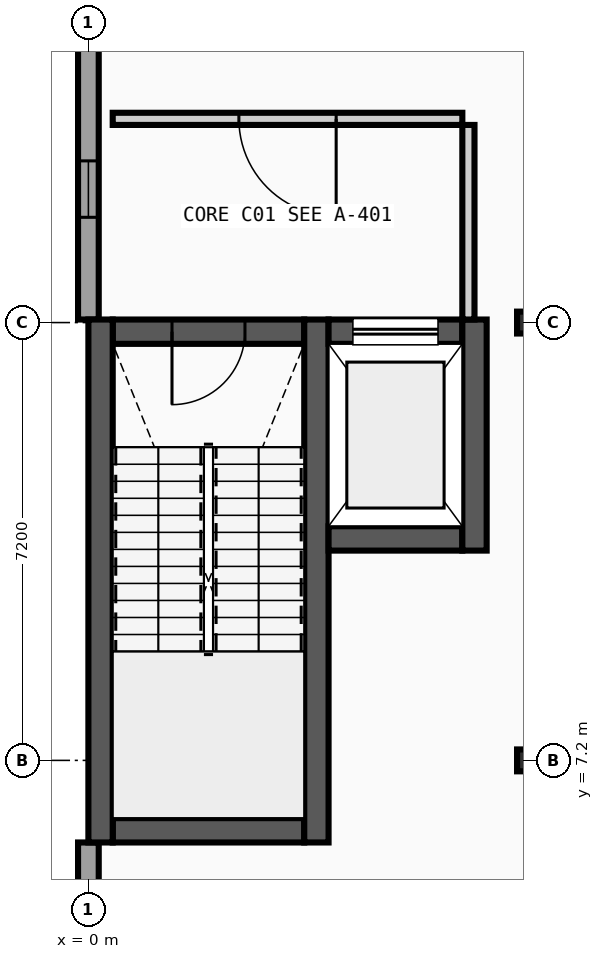
"""IFC4 building model, lengths in metres.
Left out: names, types, materials, properties, quantities, classifications, styles, units other than length and angle.
Written with IfcOpenShell. Run it as: python <this file> out.ifc"""

import sys

from ifc_helpers import new_model, si_unit, direction, frame, frame_2d, origin, origin_2d, place, context, subcontext, project, spatial, rectangle, i_section, extrude, element, fill, save


model = new_model("IFC4")
c1 = context("Model", 3, precision=1e-05, world=origin(), true_north=direction((0.0, 1.0)))
c2 = subcontext(c1, "Body", "Model", "MODEL_VIEW")
j1 = project(units=[si_unit("LENGTHUNIT", "METRE"), si_unit("PLANEANGLEUNIT", "RADIAN")], contexts=[c1])
p1 = place(None, origin())
s1 = spatial("IfcSite", under=j1, at=p1, CompositionType="ELEMENT")
p2 = place(p1, origin())
s2 = spatial("IfcBuilding", under=s1, at=p2, CompositionType="ELEMENT")
p3 = place(p2, frame((0.0, 0.0, 18.4)))
s3 = spatial("IfcBuildingStorey", under=s2, at=p3, CompositionType="ELEMENT", Elevation=18.4)
for number, where, z_axis, x_axis in (
    (1, (7.2, 7.2, 0.0), (0.0, 0.0, 1.0), (1.0, 0.0, 0.0)),
    (2, (7.2, 14.4, 0.0), (0.0, 0.0, 1.0), (1.0, 0.0, 0.0)),
):
    element("IfcColumn", number, at=place(p3, frame(where, z_axis=z_axis, x_axis=x_axis)), inside=s3, PredefinedType="COLUMN", context=c2, shape_type="SweptSolid", body=[
        extrude(i_section(OverallWidth=0.3, OverallDepth=0.36, WebThickness=0.012, FlangeThickness=0.022, FilletRadius=0.027, at=origin_2d()), origin(), (0.0, 0.0, 1.0), 4.4),
    ])
p4 = place(p3, frame((0.0, 5.85, 0.0), z_axis=(0.0, 0.0, 1.0), x_axis=(0.0, -1.0, 0.0)))
e3 = element("IfcWall", 3, at=p4, inside=s3, PredefinedType="STANDARD", context=c2, shape_type="SweptSolid", body=[
    extrude(rectangle(XDim=5.68, YDim=0.34, at=frame_2d((2.84, 0.0))), origin(), (0.0, 0.0, 1.0), 4.215),
])
p5 = place(p4, frame((2.393, 0.0, 0.95)))
e4 = element("IfcOpeningElement", 4, at=p5, cuts=e3, PredefinedType="OPENING", context=c2, shape_type="SweptSolid", body=[
    extrude(rectangle(XDim=0.894, YDim=1.404, at=frame_2d((0.447, 0.702))), frame((0.0, 0.18, 0.0), z_axis=(0.0, -1.0, 0.0), x_axis=(1.0, 0.0, 0.0)), (0.0, 0.0, 1.0), 0.36),
])
p6 = place(p3, frame((0.0, 21.6, 0.0), z_axis=(0.0, 0.0, 1.0), x_axis=(0.0, -1.0, 0.0)))
e5 = element("IfcWall", 5, at=p6, inside=s3, PredefinedType="STANDARD", context=c2, shape_type="SweptSolid", body=[
    extrude(rectangle(XDim=7.15, YDim=0.34, at=frame_2d((3.575, 0.0))), origin(), (0.0, 0.0, 1.0), 4.215),
])
p7 = place(p6, frame((1.681, 0.0, 0.95)))
e6 = element("IfcOpeningElement", 6, at=p7, cuts=e5, PredefinedType="OPENING", context=c2, shape_type="SweptSolid", body=[
    extrude(rectangle(XDim=0.928, YDim=1.404, at=frame_2d((0.464, 0.702))), frame((0.0, 0.18, 0.0), z_axis=(0.0, -1.0, 0.0), x_axis=(1.0, 0.0, 0.0)), (0.0, 0.0, 1.0), 0.36),
])
p8 = place(p6, frame((4.541, 0.0, 0.95)))
e7 = element("IfcOpeningElement", 7, at=p8, cuts=e5, PredefinedType="OPENING", context=c2, shape_type="SweptSolid", body=[
    extrude(rectangle(XDim=0.928, YDim=1.404, at=frame_2d((0.464, 0.702))), frame((0.0, 0.18, 0.0), z_axis=(0.0, -1.0, 0.0), x_axis=(1.0, 0.0, 0.0)), (0.0, 0.0, 1.0), 0.36),
])
p9 = place(p3, frame((0.4, 6.05, 0.0), z_axis=(0.0, 0.0, 1.0), x_axis=(1.0, 0.0, 0.0)))
e8 = element("IfcWall", 8, at=p9, inside=s3, PredefinedType="SHEAR", context=c2, shape_type="SweptSolid", body=[
    extrude(rectangle(XDim=3.15, YDim=0.4, at=frame_2d((1.575, 0.0))), origin(), (0.0, 0.0, 1.0), 4.215),
])
p10 = place(p3, frame((0.4, 14.25, 0.0), z_axis=(0.0, 0.0, 1.0), x_axis=(1.0, 0.0, 0.0)))
e9 = element("IfcWall", 9, at=p10, inside=s3, PredefinedType="SHEAR", context=c2, shape_type="SweptSolid", body=[
    extrude(rectangle(XDim=3.15, YDim=0.4, at=frame_2d((1.575, 0.0))), origin(), (0.0, 0.0, 1.0), 4.215),
])
p11 = place(p10, frame((0.975, 0.0, 0.0)))
e10 = element("IfcOpeningElement", 10, at=p11, cuts=e9, PredefinedType="OPENING", context=c2, shape_type="SweptSolid", body=[
    extrude(rectangle(XDim=1.2, YDim=2.15, at=frame_2d((0.6, 1.075))), frame((0.0, 0.21, 0.0), z_axis=(0.0, -1.0, 0.0), x_axis=(1.0, 0.0, 0.0)), (0.0, 0.0, 1.0), 0.42),
])
for number, where, z_axis, x_axis in (
    (11, (0.2, 5.85, 0.0), (0.0, 0.0, 1.0), (0.0, 1.0, 0.0)),
    (12, (3.75, 5.85, 0.0), (0.0, 0.0, 1.0), (0.0, 1.0, 0.0)),
):
    element("IfcWall", number, at=place(p3, frame(where, z_axis=z_axis, x_axis=x_axis)), inside=s3, PredefinedType="SHEAR", context=c2, shape_type="SweptSolid", body=[
        extrude(rectangle(XDim=8.6, YDim=0.4, at=frame_2d((4.3, 0.0))), origin(), (0.0, 0.0, 1.0), 4.215),
    ])
p12 = place(p3, frame((3.95, 10.85, 0.0), z_axis=(0.0, 0.0, 1.0), x_axis=(1.0, 0.0, 0.0)))
e13 = element("IfcWall", 13, at=p12, inside=s3, PredefinedType="SHEAR", context=c2, shape_type="SweptSolid", body=[
    extrude(rectangle(XDim=2.2, YDim=0.4, at=frame_2d((1.1, 0.0))), origin(), (0.0, 0.0, 1.0), 4.215),
])
p13 = place(p3, frame((3.95, 14.25, 0.0), z_axis=(0.0, 0.0, 1.0), x_axis=(1.0, 0.0, 0.0)))
e14 = element("IfcWall", 14, at=p13, inside=s3, PredefinedType="SHEAR", context=c2, shape_type="SweptSolid", body=[
    extrude(rectangle(XDim=2.2, YDim=0.4, at=frame_2d((1.1, 0.0))), origin(), (0.0, 0.0, 1.0), 4.215),
])
p14 = place(p13, frame((0.4, 0.0, 0.0)))
e15 = element("IfcOpeningElement", 15, at=p14, cuts=e14, PredefinedType="OPENING", context=c2, shape_type="SweptSolid", body=[
    extrude(rectangle(XDim=1.4, YDim=2.2, at=frame_2d((0.7, 1.1))), frame((0.0, 0.21, 0.0), z_axis=(0.0, -1.0, 0.0), x_axis=(1.0, 0.0, 0.0)), (0.0, 0.0, 1.0), 0.42),
])
p15 = place(p3, frame((6.35, 10.65, 0.0), z_axis=(0.0, 0.0, 1.0), x_axis=(0.0, 1.0, 0.0)))
e16 = element("IfcWall", 16, at=p15, inside=s3, PredefinedType="SHEAR", context=c2, shape_type="SweptSolid", body=[
    extrude(rectangle(XDim=3.8, YDim=0.4, at=frame_2d((1.9, 0.0))), origin(), (0.0, 0.0, 1.0), 4.215),
])
p16 = place(p3, frame((0.4, 17.75, 0.0), z_axis=(0.0, 0.0, 1.0), x_axis=(1.0, 0.0, 0.0)))
e17 = element("IfcWall", 17, at=p16, inside=s3, PredefinedType="PARTITIONING", context=c2, shape_type="SweptSolid", body=[
    extrude(rectangle(XDim=5.75, YDim=0.2, at=frame_2d((2.875, 0.0))), origin(), (0.0, 0.0, 1.0), 4.215),
])
p17 = place(p16, frame((2.075, 0.0, 0.0)))
e18 = element("IfcOpeningElement", 18, at=p17, cuts=e17, PredefinedType="OPENING", context=c2, shape_type="SweptSolid", body=[
    extrude(rectangle(XDim=1.6, YDim=2.2, at=frame_2d((0.8, 1.1))), frame((0.0, 0.11, 0.0), z_axis=(0.0, -1.0, 0.0), x_axis=(1.0, 0.0, 0.0)), (0.0, 0.0, 1.0), 0.22),
])
p18 = place(p3, frame((6.25, 14.45, 0.0), z_axis=(0.0, 0.0, 1.0), x_axis=(0.0, 1.0, 0.0)))
e19 = element("IfcWall", 19, at=p18, inside=s3, PredefinedType="PARTITIONING", context=c2, shape_type="SweptSolid", body=[
    extrude(rectangle(XDim=3.2, YDim=0.2, at=frame_2d((1.6, 0.0))), origin(), (0.0, 0.0, 1.0), 4.215),
])
p19 = place(p8, origin())
e20 = element("IfcWindow", 20, at=p19, inside=s3, PartitioningType="SINGLE_PANEL", PredefinedType="WINDOW", context=c2, shape_type="SweptSolid", body=[
    extrude(rectangle(XDim=0.928, YDim=1.404, at=frame_2d((0.464, 0.702))), frame((0.0, 0.03, 0.0), z_axis=(0.0, -1.0, 0.0), x_axis=(1.0, 0.0, 0.0)), (0.0, 0.0, 1.0), 0.06),
])
fill(e7, e20)
p20 = place(p11, frame((1.2, 0.0, 0.0), z_axis=(0.0, 0.0, 1.0), x_axis=(-1.0, 0.0, 0.0)))
e21 = element("IfcDoor", 21, at=p20, inside=s3, OperationType="SINGLE_SWING_LEFT", PredefinedType="DOOR", context=c2, shape_type="SweptSolid", body=[
    extrude(rectangle(XDim=1.2, YDim=2.15, at=frame_2d((0.6, 1.075))), frame((0.0, 0.025, 0.0), z_axis=(0.0, -1.0, 0.0), x_axis=(1.0, 0.0, 0.0)), (0.0, 0.0, 1.0), 0.05),
])
fill(e10, e21)
p21 = place(p14, origin())
e22 = element("IfcDoor", 22, at=p21, inside=s3, OperationType="SLIDING_TO_LEFT", PredefinedType="DOOR", context=c2, shape_type="SweptSolid", body=[
    extrude(rectangle(XDim=1.4, YDim=2.2, at=frame_2d((0.7, 1.1))), frame((0.0, 0.025, 0.0), z_axis=(0.0, -1.0, 0.0), x_axis=(1.0, 0.0, 0.0)), (0.0, 0.0, 1.0), 0.05),
])
fill(e15, e22)
p22 = place(p17, origin())
e23 = element("IfcDoor", 23, at=p22, inside=s3, OperationType="DOUBLE_DOOR_SINGLE_SWING", PredefinedType="DOOR", context=c2, shape_type="SweptSolid", body=[
    extrude(rectangle(XDim=1.6, YDim=2.2, at=frame_2d((0.8, 1.1))), frame((0.0, 0.025, 0.0), z_axis=(0.0, -1.0, 0.0), x_axis=(1.0, 0.0, 0.0)), (0.0, 0.0, 1.0), 0.05),
])
fill(e18, e23)
save(model, sys.argv[1])
